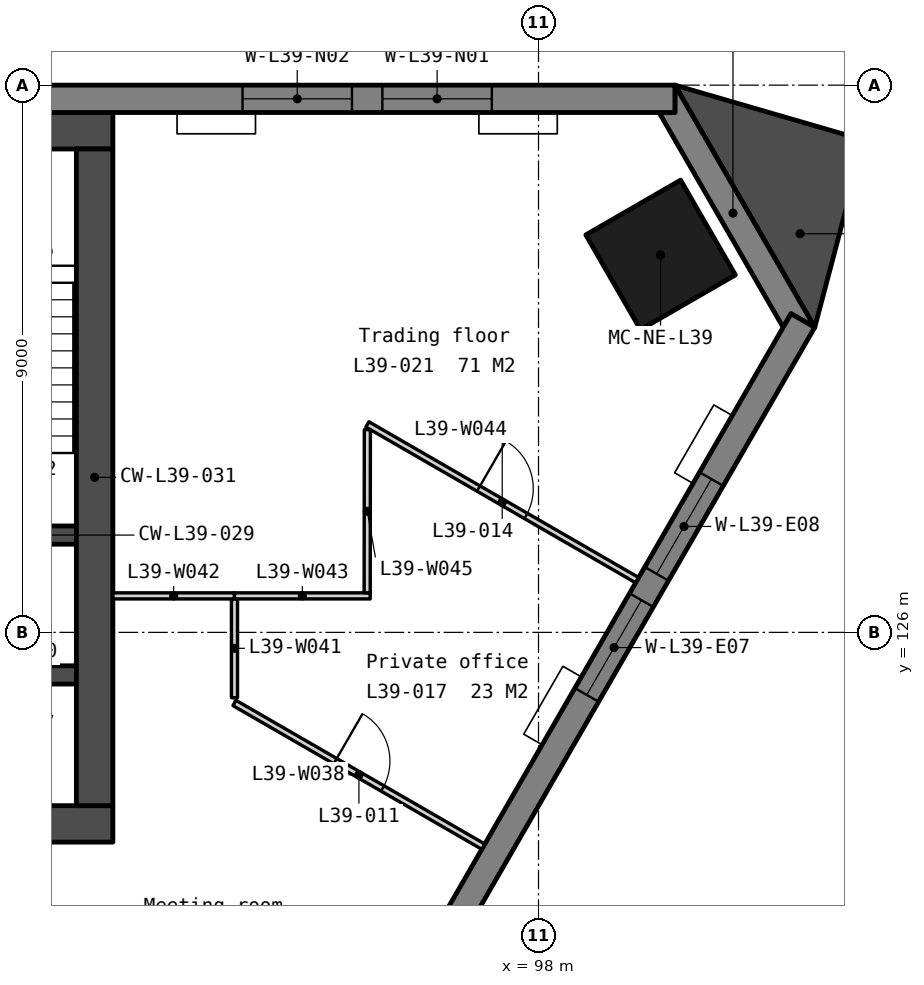
"""IFC4 building model, lengths in metres.
Left out: names, types, materials, properties, quantities, classifications, styles, units other than length and angle.
Written with IfcOpenShell. Run it as: python <this file> out.ifc"""

import sys

from ifc_helpers import new_model, si_unit, direction, frame, frame_2d, origin, origin_2d, place, context, subcontext, project, spatial, polyline, rectangle, outline, extrude, element, fill, save


model = new_model("IFC4")
c1 = context("Model", 3, precision=1e-05, world=origin(), true_north=direction((0.0, 1.0)))
c2 = subcontext(c1, "Body", "Model", "MODEL_VIEW")
j1 = project(units=[si_unit("LENGTHUNIT", "METRE"), si_unit("PLANEANGLEUNIT", "RADIAN")], contexts=[c1])
p1 = place(None, origin())
s1 = spatial("IfcSite", under=j1, at=p1, CompositionType="ELEMENT")
p2 = place(p1, origin())
s2 = spatial("IfcBuilding", under=s1, at=p2, CompositionType="ELEMENT")
p3 = place(p2, frame((0.0, 0.0, 155.9)))
s3 = spatial("IfcBuildingStorey", under=s2, at=p3, CompositionType="ELEMENT", Elevation=155.9)
p4 = place(p3, frame((100.007, 132.208, 0.0), z_axis=(0.0, 0.0, 1.0), x_axis=(-0.5, 0.866025403784, 0.0)))
e1 = element("IfcColumn", 1, at=p4, inside=s3, PredefinedType="COLUMN", context=c2, shape_type="SweptSolid", body=[
    extrude(rectangle(XDim=1.8, YDim=1.8, at=origin_2d()), origin(), (0.0, 0.0, 1.0), 3.9),
])
p5 = place(p3, frame((69.0, 134.25, 0.0), z_axis=(0.0, 0.0, 1.0), x_axis=(1.0, 0.0, 0.0)))
e2 = element("IfcWall", 2, at=p5, inside=s3, PredefinedType="SOLIDWALL", context=c2, shape_type="SweptSolid", body=[
    extrude(rectangle(XDim=22.0, YDim=0.6, at=frame_2d((11.0, 0.0))), origin(), (0.0, 0.0, 1.0), 3.75),
])
p6 = place(p3, frame((69.0, 122.85, 0.0), z_axis=(0.0, 0.0, 1.0), x_axis=(1.0, 0.0, 0.0)))
e3 = element("IfcWall", 3, at=p6, inside=s3, PredefinedType="SOLIDWALL", context=c2, shape_type="SweptSolid", body=[
    extrude(rectangle(XDim=22.0, YDim=0.6, at=frame_2d((11.0, 0.0))), origin(), (0.0, 0.0, 1.0), 3.75),
])
p7 = place(p6, frame((16.375, 0.0, 0.0)))
e4 = element("IfcOpeningElement", 4, at=p7, cuts=e3, PredefinedType="OPENING", context=c2, shape_type="SweptSolid", body=[
    extrude(rectangle(XDim=1.8, YDim=2.1, at=frame_2d((0.9, 1.05))), frame((0.0, 0.31, 0.0), z_axis=(0.0, -1.0, 0.0), x_axis=(1.0, 0.0, 0.0)), (0.0, 0.0, 1.0), 0.62),
])
p8 = place(p6, frame((3.825, 0.0, 0.0)))
e5 = element("IfcOpeningElement", 5, at=p8, cuts=e3, PredefinedType="OPENING", context=c2, shape_type="SweptSolid", body=[
    extrude(rectangle(XDim=1.8, YDim=2.1, at=frame_2d((0.9, 1.05))), frame((0.0, 0.31, 0.0), z_axis=(0.0, -1.0, 0.0), x_axis=(1.0, 0.0, 0.0)), (0.0, 0.0, 1.0), 0.62),
])
p9 = place(p6, frame((12.85, 0.0, 0.0)))
e6 = element("IfcOpeningElement", 6, at=p9, cuts=e3, PredefinedType="OPENING", context=c2, shape_type="SweptSolid", body=[
    extrude(rectangle(XDim=1.5, YDim=2.1, at=frame_2d((0.75, 1.05))), frame((0.0, 0.31, 0.0), z_axis=(0.0, -1.0, 0.0), x_axis=(1.0, 0.0, 0.0)), (0.0, 0.0, 1.0), 0.62),
])
for number, where, z_axis, x_axis in (
    (7, (87.85, 127.6, 0.0), (0.0, 0.0, 1.0), (1.0, 0.0, 0.0)),
    (8, (87.85, 125.3, 0.0), (0.0, 0.0, 1.0), (1.0, 0.0, 0.0)),
):
    element("IfcWall", number, at=place(p3, frame(where, z_axis=z_axis, x_axis=x_axis)), inside=s3, PredefinedType="SOLIDWALL", context=c2, shape_type="SweptSolid", body=[
        extrude(rectangle(XDim=2.55, YDim=0.3, at=frame_2d((1.275, 0.0))), origin(), (0.0, 0.0, 1.0), 3.75),
    ])
p10 = place(p3, frame((90.7, 133.95, 0.0), z_axis=(0.0, 0.0, 1.0), x_axis=(0.0, -1.0, 0.0)))
e9 = element("IfcWall", 9, at=p10, inside=s3, PredefinedType="SOLIDWALL", context=c2, shape_type="SweptSolid", body=[
    extrude(rectangle(XDim=10.8, YDim=0.6, at=frame_2d((5.4, 0.0))), origin(), (0.0, 0.0, 1.0), 3.75),
])
p11 = place(p3, frame((0.0, 0.0, -0.15)))
e10 = element("IfcWall", 10, at=p11, inside=s3, PredefinedType="SOLIDWALL", context=c2, shape_type="SweptSolid", body=[
    extrude(outline(polyline([(102.543, 131.016), (102.153, 131.241), (102.023, 131.016), (99.983, 134.55), (100.243, 134.55), (100.243, 135.0), (102.543, 131.016)])), origin(), (0.0, 0.0, 1.0), 3.9),
])
p12 = place(p3, frame((100.243, 134.775, -0.15), z_axis=(0.0, 0.0, 1.0), x_axis=(-1.0, 0.0, 0.0)))
e11 = element("IfcWall", 11, at=p12, inside=s3, PredefinedType="SOLIDWALL", context=c2, shape_type="SweptSolid", body=[
    extrude(outline(polyline([(40.486, 0.0), (40.486, 3.9), (0.0, 3.9), (0.0, 0.0), (40.486, 0.0)])), frame((0.0, 0.225, 0.0), z_axis=(0.0, -1.0, 0.0), x_axis=(1.0, 0.0, 0.0)), (0.0, 0.0, 1.0), 0.45),
])
p13 = place(p12, frame((3.011, 0.0, 0.95)))
e12 = element("IfcOpeningElement", 12, at=p13, cuts=e11, PredefinedType="OPENING", context=c2, shape_type="SweptSolid", body=[
    extrude(rectangle(XDim=1.8, YDim=2.2, at=frame_2d((0.9, 1.1))), frame((0.0, 0.235, 0.0), z_axis=(0.0, -1.0, 0.0), x_axis=(1.0, 0.0, 0.0)), (0.0, 0.0, 1.0), 0.47),
])
p14 = place(p12, frame((5.311, 0.0, 0.95)))
e13 = element("IfcOpeningElement", 13, at=p14, cuts=e11, PredefinedType="OPENING", context=c2, shape_type="SweptSolid", body=[
    extrude(rectangle(XDim=1.8, YDim=2.2, at=frame_2d((0.9, 1.1))), frame((0.0, 0.235, 0.0), z_axis=(0.0, -1.0, 0.0), x_axis=(1.0, 0.0, 0.0)), (0.0, 0.0, 1.0), 0.47),
])
p15 = place(p12, frame((13.132, 0.0, 0.95)))
e14 = element("IfcOpeningElement", 14, at=p15, cuts=e11, PredefinedType="OPENING", context=c2, shape_type="SweptSolid", body=[
    extrude(rectangle(XDim=1.8, YDim=2.2, at=frame_2d((0.9, 1.1))), frame((0.0, 0.235, 0.0), z_axis=(0.0, -1.0, 0.0), x_axis=(1.0, 0.0, 0.0)), (0.0, 0.0, 1.0), 0.47),
])
p16 = place(p12, frame((15.432, 0.0, 0.95)))
e15 = element("IfcOpeningElement", 15, at=p16, cuts=e11, PredefinedType="OPENING", context=c2, shape_type="SweptSolid", body=[
    extrude(rectangle(XDim=1.8, YDim=2.2, at=frame_2d((0.9, 1.1))), frame((0.0, 0.235, 0.0), z_axis=(0.0, -1.0, 0.0), x_axis=(1.0, 0.0, 0.0)), (0.0, 0.0, 1.0), 0.47),
])
p17 = place(p12, frame((23.254, 0.0, 0.95)))
e16 = element("IfcOpeningElement", 16, at=p17, cuts=e11, PredefinedType="OPENING", context=c2, shape_type="SweptSolid", body=[
    extrude(rectangle(XDim=1.8, YDim=2.2, at=frame_2d((0.9, 1.1))), frame((0.0, 0.235, 0.0), z_axis=(0.0, -1.0, 0.0), x_axis=(1.0, 0.0, 0.0)), (0.0, 0.0, 1.0), 0.47),
])
p18 = place(p12, frame((25.554, 0.0, 0.95)))
e17 = element("IfcOpeningElement", 17, at=p18, cuts=e11, PredefinedType="OPENING", context=c2, shape_type="SweptSolid", body=[
    extrude(rectangle(XDim=1.8, YDim=2.2, at=frame_2d((0.9, 1.1))), frame((0.0, 0.235, 0.0), z_axis=(0.0, -1.0, 0.0), x_axis=(1.0, 0.0, 0.0)), (0.0, 0.0, 1.0), 0.47),
])
p19 = place(p12, frame((33.375, 0.0, 0.95)))
e18 = element("IfcOpeningElement", 18, at=p19, cuts=e11, PredefinedType="OPENING", context=c2, shape_type="SweptSolid", body=[
    extrude(rectangle(XDim=1.8, YDim=2.2, at=frame_2d((0.9, 1.1))), frame((0.0, 0.235, 0.0), z_axis=(0.0, -1.0, 0.0), x_axis=(1.0, 0.0, 0.0)), (0.0, 0.0, 1.0), 0.47),
])
p20 = place(p12, frame((35.675, 0.0, 0.95)))
e19 = element("IfcOpeningElement", 19, at=p20, cuts=e11, PredefinedType="OPENING", context=c2, shape_type="SweptSolid", body=[
    extrude(rectangle(XDim=1.8, YDim=2.2, at=frame_2d((0.9, 1.1))), frame((0.0, 0.235, 0.0), z_axis=(0.0, -1.0, 0.0), x_axis=(1.0, 0.0, 0.0)), (0.0, 0.0, 1.0), 0.47),
])
p21 = place(p3, frame((82.105, 96.067, -0.15), z_axis=(0.0, 0.0, 1.0), x_axis=(0.499997369791, 0.866026922331, 0.0)))
e20 = element("IfcWall", 20, at=p21, inside=s3, PredefinedType="SOLIDWALL", context=c2, shape_type="SweptSolid", body=[
    extrude(outline(polyline([(40.486, 0.0), (40.486, 3.9), (0.0, 3.9), (0.0, 0.0), (40.486, 0.0)])), frame((0.0, 0.225, 0.0), z_axis=(0.0, -1.0, 0.0), x_axis=(1.0, 0.0, 0.0)), (0.0, 0.0, 1.0), 0.45),
])
p22 = place(p21, frame((3.011, 0.0, 0.95)))
e21 = element("IfcOpeningElement", 21, at=p22, cuts=e20, PredefinedType="OPENING", context=c2, shape_type="SweptSolid", body=[
    extrude(rectangle(XDim=1.8, YDim=2.2, at=frame_2d((0.9, 1.1))), frame((0.0, 0.235, 0.0), z_axis=(0.0, -1.0, 0.0), x_axis=(1.0, 0.0, 0.0)), (0.0, 0.0, 1.0), 0.47),
])
p23 = place(p21, frame((5.311, 0.0, 0.95)))
e22 = element("IfcOpeningElement", 22, at=p23, cuts=e20, PredefinedType="OPENING", context=c2, shape_type="SweptSolid", body=[
    extrude(rectangle(XDim=1.8, YDim=2.2, at=frame_2d((0.9, 1.1))), frame((0.0, 0.235, 0.0), z_axis=(0.0, -1.0, 0.0), x_axis=(1.0, 0.0, 0.0)), (0.0, 0.0, 1.0), 0.47),
])
p24 = place(p21, frame((13.132, 0.0, 0.95)))
e23 = element("IfcOpeningElement", 23, at=p24, cuts=e20, PredefinedType="OPENING", context=c2, shape_type="SweptSolid", body=[
    extrude(rectangle(XDim=1.8, YDim=2.2, at=frame_2d((0.9, 1.1))), frame((0.0, 0.235, 0.0), z_axis=(0.0, -1.0, 0.0), x_axis=(1.0, 0.0, 0.0)), (0.0, 0.0, 1.0), 0.47),
])
p25 = place(p21, frame((15.432, 0.0, 0.95)))
e24 = element("IfcOpeningElement", 24, at=p25, cuts=e20, PredefinedType="OPENING", context=c2, shape_type="SweptSolid", body=[
    extrude(rectangle(XDim=1.8, YDim=2.2, at=frame_2d((0.9, 1.1))), frame((0.0, 0.235, 0.0), z_axis=(0.0, -1.0, 0.0), x_axis=(1.0, 0.0, 0.0)), (0.0, 0.0, 1.0), 0.47),
])
p26 = place(p21, frame((23.254, 0.0, 0.95)))
e25 = element("IfcOpeningElement", 25, at=p26, cuts=e20, PredefinedType="OPENING", context=c2, shape_type="SweptSolid", body=[
    extrude(rectangle(XDim=1.8, YDim=2.2, at=frame_2d((0.9, 1.1))), frame((0.0, 0.235, 0.0), z_axis=(0.0, -1.0, 0.0), x_axis=(1.0, 0.0, 0.0)), (0.0, 0.0, 1.0), 0.47),
])
p27 = place(p21, frame((25.554, 0.0, 0.95)))
e26 = element("IfcOpeningElement", 26, at=p27, cuts=e20, PredefinedType="OPENING", context=c2, shape_type="SweptSolid", body=[
    extrude(rectangle(XDim=1.8, YDim=2.2, at=frame_2d((0.9, 1.1))), frame((0.0, 0.235, 0.0), z_axis=(0.0, -1.0, 0.0), x_axis=(1.0, 0.0, 0.0)), (0.0, 0.0, 1.0), 0.47),
])
p28 = place(p21, frame((33.375, 0.0, 0.95)))
e27 = element("IfcOpeningElement", 27, at=p28, cuts=e20, PredefinedType="OPENING", context=c2, shape_type="SweptSolid", body=[
    extrude(rectangle(XDim=1.8, YDim=2.2, at=frame_2d((0.9, 1.1))), frame((0.0, 0.235, 0.0), z_axis=(0.0, -1.0, 0.0), x_axis=(1.0, 0.0, 0.0)), (0.0, 0.0, 1.0), 0.47),
])
p29 = place(p21, frame((35.675, 0.0, 0.95)))
e28 = element("IfcOpeningElement", 28, at=p29, cuts=e20, PredefinedType="OPENING", context=c2, shape_type="SweptSolid", body=[
    extrude(rectangle(XDim=1.8, YDim=2.2, at=frame_2d((0.9, 1.1))), frame((0.0, 0.235, 0.0), z_axis=(0.0, -1.0, 0.0), x_axis=(1.0, 0.0, 0.0)), (0.0, 0.0, 1.0), 0.47),
])
p30 = place(p3, frame((0.0, 0.0, -0.15)))
e29 = element("IfcWall", 29, at=p30, inside=s3, PredefinedType="SOLIDWALL", context=c2, shape_type="SweptSolid", body=[
    extrude(outline(polyline([(102.543, 131.016), (103.356, 134.096), (100.243, 135.0), (102.543, 131.016)])), origin(), (0.0, 0.0, 1.0), 3.9),
])
p31 = place(p3, frame((93.0, 124.839, 0.0), z_axis=(0.0, 0.0, 1.0), x_axis=(0.866028145587, -0.499995251029, 0.0)))
e30 = element("IfcWall", 30, at=p31, inside=s3, PredefinedType="PARTITIONING", context=c2, shape_type="SweptSolid", body=[
    extrude(rectangle(XDim=4.726, YDim=0.1, at=frame_2d((2.363, 0.0))), origin(), (0.0, 0.0, 1.0), 3.75),
])
p32 = place(p31, frame((1.913, 0.0, 0.0)))
e31 = element("IfcOpeningElement", 31, at=p32, cuts=e30, PredefinedType="OPENING", context=c2, shape_type="SweptSolid", body=[
    extrude(rectangle(XDim=0.9, YDim=2.1, at=frame_2d((0.45, 1.05))), frame((0.0, 0.06, 0.0), z_axis=(0.0, -1.0, 0.0), x_axis=(1.0, 0.0, 0.0)), (0.0, 0.0, 1.0), 0.12),
])
p33 = place(p3, frame((93.0, 124.925, 0.0), z_axis=(0.0, 0.0, 1.0), x_axis=(0.0, 1.0, 0.0)))
e32 = element("IfcWall", 32, at=p33, inside=s3, PredefinedType="PARTITIONING", context=c2, shape_type="SweptSolid", body=[
    extrude(rectangle(XDim=1.625, YDim=0.1, at=frame_2d((0.812, 0.0))), origin(), (0.0, 0.0, 1.0), 3.75),
])
p34 = place(p3, frame((91.0, 126.6, 0.0), z_axis=(0.0, 0.0, 1.0), x_axis=(1.0, 0.0, 0.0)))
e33 = element("IfcWall", 33, at=p34, inside=s3, PredefinedType="PARTITIONING", context=c2, shape_type="SweptSolid", body=[
    extrude(rectangle(XDim=2.0, YDim=0.1, at=frame_2d((1.0, 0.0))), origin(), (0.0, 0.0, 1.0), 3.75),
])
p35 = place(p3, frame((93.0, 126.6, 0.0), z_axis=(0.0, 0.0, 1.0), x_axis=(1.0, 0.0, 0.0)))
e34 = element("IfcWall", 34, at=p35, inside=s3, PredefinedType="PARTITIONING", context=c2, shape_type="SweptSolid", body=[
    extrude(rectangle(XDim=2.232, YDim=0.1, at=frame_2d((1.116, 0.0))), origin(), (0.0, 0.0, 1.0), 3.75),
])
p36 = place(p3, frame((95.185, 129.421, 0.0), z_axis=(0.0, 0.0, 1.0), x_axis=(0.866034781647, -0.499983756713, 0.0)))
e35 = element("IfcWall", 35, at=p36, inside=s3, PredefinedType="PARTITIONING", context=c2, shape_type="SweptSolid", body=[
    extrude(rectangle(XDim=5.122, YDim=0.1, at=frame_2d((2.561, 0.0))), origin(), (0.0, 0.0, 1.0), 3.75),
])
p37 = place(p36, frame((2.111, 0.0, 0.0)))
e36 = element("IfcOpeningElement", 36, at=p37, cuts=e35, PredefinedType="OPENING", context=c2, shape_type="SweptSolid", body=[
    extrude(rectangle(XDim=0.9, YDim=2.1, at=frame_2d((0.45, 1.05))), frame((0.0, 0.06, 0.0), z_axis=(0.0, -1.0, 0.0), x_axis=(1.0, 0.0, 0.0)), (0.0, 0.0, 1.0), 0.12),
])
p38 = place(p3, frame((95.182, 126.65, 0.0), z_axis=(0.0, 0.0, 1.0), x_axis=(0.001091404534, 0.999999404418, 0.0)))
e37 = element("IfcWall", 37, at=p38, inside=s3, PredefinedType="PARTITIONING", context=c2, shape_type="SweptSolid", body=[
    extrude(rectangle(XDim=2.684, YDim=0.1, at=frame_2d((1.342, 0.0))), origin(), (0.0, 0.0, 1.0), 3.75),
])
p39 = place(p13, origin())
e38 = element("IfcWindow", 38, at=p39, inside=s3, PartitioningType="SINGLE_PANEL", PredefinedType="WINDOW", context=c2, shape_type="SweptSolid", body=[
    extrude(rectangle(XDim=1.8, YDim=2.2, at=frame_2d((0.9, 1.1))), frame((0.0, 0.03, 0.0), z_axis=(0.0, -1.0, 0.0), x_axis=(1.0, 0.0, 0.0)), (0.0, 0.0, 1.0), 0.06),
])
fill(e12, e38)
p40 = place(p14, origin())
e39 = element("IfcWindow", 39, at=p40, inside=s3, PartitioningType="SINGLE_PANEL", PredefinedType="WINDOW", context=c2, shape_type="SweptSolid", body=[
    extrude(rectangle(XDim=1.8, YDim=2.2, at=frame_2d((0.9, 1.1))), frame((0.0, 0.03, 0.0), z_axis=(0.0, -1.0, 0.0), x_axis=(1.0, 0.0, 0.0)), (0.0, 0.0, 1.0), 0.06),
])
fill(e13, e39)
p41 = place(p28, origin())
e40 = element("IfcWindow", 40, at=p41, inside=s3, PartitioningType="SINGLE_PANEL", PredefinedType="WINDOW", context=c2, shape_type="SweptSolid", body=[
    extrude(rectangle(XDim=1.8, YDim=2.2, at=frame_2d((0.9, 1.1))), frame((0.0, 0.03, 0.0), z_axis=(0.0, -1.0, 0.0), x_axis=(1.0, 0.0, 0.0)), (0.0, 0.0, 1.0), 0.06),
])
fill(e27, e40)
p42 = place(p29, origin())
e41 = element("IfcWindow", 41, at=p42, inside=s3, PartitioningType="SINGLE_PANEL", PredefinedType="WINDOW", context=c2, shape_type="SweptSolid", body=[
    extrude(rectangle(XDim=1.8, YDim=2.2, at=frame_2d((0.9, 1.1))), frame((0.0, 0.03, 0.0), z_axis=(0.0, -1.0, 0.0), x_axis=(1.0, 0.0, 0.0)), (0.0, 0.0, 1.0), 0.06),
])
fill(e28, e41)
p43 = place(p32, origin())
e42 = element("IfcDoor", 42, at=p43, inside=s3, OperationType="SINGLE_SWING_LEFT", PredefinedType="DOOR", context=c2, shape_type="SweptSolid", body=[
    extrude(rectangle(XDim=0.9, YDim=2.1, at=frame_2d((0.45, 1.05))), frame((0.0, 0.025, 0.0), z_axis=(0.0, -1.0, 0.0), x_axis=(1.0, 0.0, 0.0)), (0.0, 0.0, 1.0), 0.05),
])
fill(e31, e42)
p44 = place(p37, origin())
e43 = element("IfcDoor", 43, at=p44, inside=s3, OperationType="SINGLE_SWING_LEFT", PredefinedType="DOOR", context=c2, shape_type="SweptSolid", body=[
    extrude(rectangle(XDim=0.9, YDim=2.1, at=frame_2d((0.45, 1.05))), frame((0.0, 0.025, 0.0), z_axis=(0.0, -1.0, 0.0), x_axis=(1.0, 0.0, 0.0)), (0.0, 0.0, 1.0), 0.05),
])
fill(e36, e43)
save(model, sys.argv[1])
